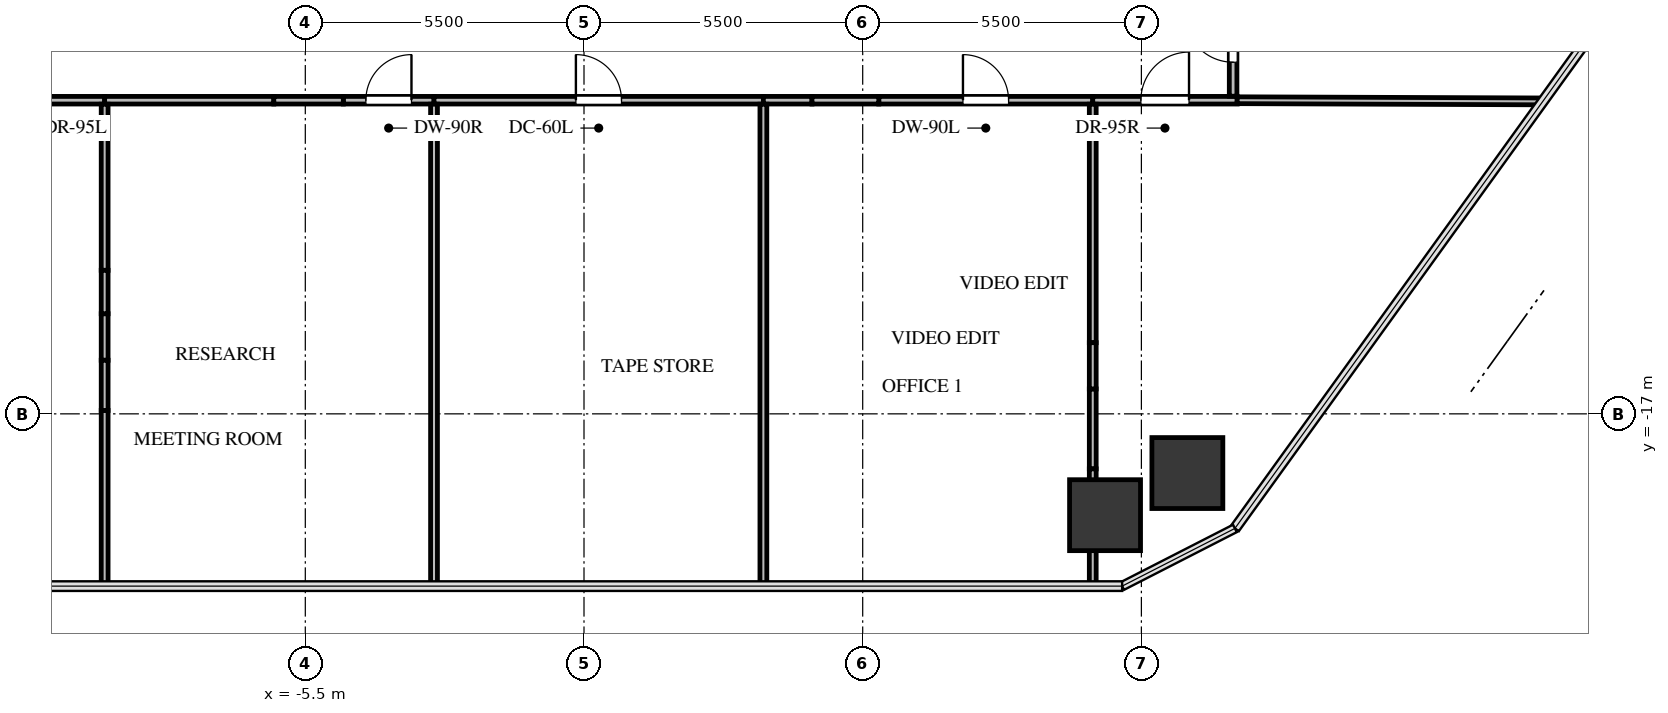
"""IFC4 building model, lengths in metres.
Left out: names, types, materials, properties, quantities, classifications, styles, units other than length and angle.
Written with IfcOpenShell. Run it as: python <this file> out.ifc"""

import sys

from ifc_helpers import new_model, si_unit, direction, frame, frame_2d, origin, origin_2d, place, context, subcontext, project, spatial, rectangle, extrude, source, transform, mapped, element, fill, save


model = new_model("IFC4")
c1 = context("Model", 3, precision=1e-05, world=origin(), true_north=direction((0.0, 1.0)))
c2 = subcontext(c1, "Body", "Model", "MODEL_VIEW")
j1 = project(units=[si_unit("LENGTHUNIT", "METRE"), si_unit("PLANEANGLEUNIT", "RADIAN")], contexts=[c1])
p1 = place(None, origin())
s1 = spatial("IfcSite", under=j1, at=p1, CompositionType="ELEMENT")
p2 = place(p1, origin())
s2 = spatial("IfcBuilding", under=s1, at=p2, CompositionType="ELEMENT")
p3 = place(p2, frame((0.0, 0.0, 42.3)))
s3 = spatial("IfcBuildingStorey", under=s2, at=p3, CompositionType="ELEMENT", Elevation=42.3)
m1 = source(origin(), c2, "Body", "SweptSolid", [
    extrude(rectangle(XDim=1.4, YDim=1.4, at=origin_2d()), origin(), (0.0, 0.0, 1.0), 3.3),
])
for number, where, z_axis, x_axis in (
    (1, (11.907, -18.168, -0.24), (0.0, 0.0, 1.0), (1.0, 0.0, 0.0)),
    (2, (10.283, -19.0, -0.24), (0.0, 0.0, 1.0), (1.0, 0.0, 0.0)),
):
    element("IfcColumn", number, at=place(p3, frame(where, z_axis=z_axis, x_axis=x_axis)), inside=s3, PredefinedType="COLUMN", context=c2, shape_type="MappedRepresentation", body=[
        mapped(m1, transform((0.0, 0.0, 0.0), x_axis=(1.0, 0.0, 0.0), y_axis=(0.0, 1.0, 0.0), z_axis=(0.0, 0.0, 1.0), scale=1.0)),
    ])
p4 = place(p3, frame((-12.89, -10.81, 0.0), z_axis=(0.0, 0.0, 1.0), x_axis=(1.0, 0.0, 0.0)))
e3 = element("IfcWall", 3, at=p4, inside=s3, PredefinedType="PARTITIONING", context=c2, shape_type="SweptSolid", body=[
    extrude(rectangle(XDim=3.43, YDim=0.15, at=frame_2d((1.715, 0.0))), origin(), (0.0, 0.0, 1.0), 3.045),
])
p5 = place(p4, frame((1.24, 0.0, 0.0)))
e4 = element("IfcOpeningElement", 4, at=p5, cuts=e3, PredefinedType="OPENING", context=c2, shape_type="SweptSolid", body=[
    extrude(rectangle(XDim=0.95, YDim=2.1, at=frame_2d((0.475, 1.05))), frame((0.0, 0.085, 0.0), z_axis=(0.0, -1.0, 0.0), x_axis=(1.0, 0.0, 0.0)), (0.0, 0.0, 1.0), 0.17),
])
p6 = place(p3, frame((-9.46, -10.81, 0.0), z_axis=(0.0, 0.0, 1.0), x_axis=(1.0, 0.0, 0.0)))
e5 = element("IfcWall", 5, at=p6, inside=s3, PredefinedType="PARTITIONING", context=c2, shape_type="SweptSolid", body=[
    extrude(rectangle(XDim=3.338, YDim=0.15, at=frame_2d((1.669, 0.0))), origin(), (0.0, 0.0, 1.0), 2.13),
])
p7 = place(p3, frame((-4.75, -10.81, 0.0), z_axis=(0.0, 0.0, 1.0), x_axis=(1.0, 0.0, 0.0)))
e6 = element("IfcWall", 6, at=p7, inside=s3, PredefinedType="PARTITIONING", context=c2, shape_type="SweptSolid", body=[
    extrude(rectangle(XDim=1.79, YDim=0.15, at=frame_2d((0.895, 0.0))), origin(), (0.0, 0.0, 1.0), 3.045),
])
p8 = place(p7, frame((0.445, 0.0, 0.0)))
e7 = element("IfcOpeningElement", 7, at=p8, cuts=e6, PredefinedType="OPENING", context=c2, shape_type="SweptSolid", body=[
    extrude(rectangle(XDim=0.9, YDim=2.05, at=frame_2d((0.45, 1.025))), frame((0.0, 0.085, 0.0), z_axis=(0.0, -1.0, 0.0), x_axis=(1.0, 0.0, 0.0)), (0.0, 0.0, 1.0), 0.17),
])
p9 = place(p3, frame((-6.122, -10.81, 0.0), z_axis=(0.0, 0.0, 1.0), x_axis=(1.0, 0.0, 0.0)))
e8 = element("IfcWall", 8, at=p9, inside=s3, PredefinedType="PARTITIONING", context=c2, shape_type="SweptSolid", body=[
    extrude(rectangle(XDim=1.372, YDim=0.15, at=frame_2d((0.686, 0.0))), origin(), (0.0, 0.0, 1.0), 2.13),
])
p10 = place(p3, frame((-2.96, -10.81, 0.0), z_axis=(0.0, 0.0, 1.0), x_axis=(1.0, 0.0, 0.0)))
e9 = element("IfcWall", 9, at=p10, inside=s3, PredefinedType="PARTITIONING", context=c2, shape_type="SweptSolid", body=[
    extrude(rectangle(XDim=6.5, YDim=0.15, at=frame_2d((3.25, 0.0))), origin(), (0.0, 0.0, 1.0), 3.045),
])
p11 = place(p10, frame((2.8, 0.0, 0.0)))
e10 = element("IfcOpeningElement", 10, at=p11, cuts=e9, PredefinedType="OPENING", context=c2, shape_type="SweptSolid", body=[
    extrude(rectangle(XDim=0.9, YDim=2.05, at=frame_2d((0.45, 1.025))), frame((0.0, 0.085, 0.0), z_axis=(0.0, -1.0, 0.0), x_axis=(1.0, 0.0, 0.0)), (0.0, 0.0, 1.0), 0.17),
])
p12 = place(p3, frame((3.54, -10.81, 0.0), z_axis=(0.0, 0.0, 1.0), x_axis=(1.0, 0.0, 0.0)))
e11 = element("IfcWall", 11, at=p12, inside=s3, PredefinedType="PARTITIONING", context=c2, shape_type="SweptSolid", body=[
    extrude(rectangle(XDim=0.959, YDim=0.15, at=frame_2d((0.479, 0.0))), origin(), (0.0, 0.0, 1.0), 3.045),
])
p13 = place(p3, frame((5.817, -10.81, 0.0), z_axis=(0.0, 0.0, 1.0), x_axis=(1.0, 0.0, 0.0)))
e12 = element("IfcWall", 12, at=p13, inside=s3, PredefinedType="PARTITIONING", context=c2, shape_type="SweptSolid", body=[
    extrude(rectangle(XDim=4.223, YDim=0.15, at=frame_2d((2.111, 0.0))), origin(), (0.0, 0.0, 1.0), 2.13),
])
p14 = place(p13, frame((1.661, 0.0, 0.0)))
e13 = element("IfcOpeningElement", 13, at=p14, cuts=e12, PredefinedType="OPENING", context=c2, shape_type="SweptSolid", body=[
    extrude(rectangle(XDim=0.9, YDim=2.05, at=frame_2d((0.45, 1.025))), frame((0.0, 0.085, 0.0), z_axis=(0.0, -1.0, 0.0), x_axis=(1.0, 0.0, 0.0)), (0.0, 0.0, 1.0), 0.17),
])
p15 = place(p3, frame((4.499, -10.81, 0.0), z_axis=(0.0, 0.0, 1.0), x_axis=(1.0, 0.0, 0.0)))
e14 = element("IfcWall", 14, at=p15, inside=s3, PredefinedType="PARTITIONING", context=c2, shape_type="SweptSolid", body=[
    extrude(rectangle(XDim=1.318, YDim=0.15, at=frame_2d((0.659, 0.0))), origin(), (0.0, 0.0, 1.0), 2.13),
])
p16 = place(p3, frame((10.04, -10.81, 0.0), z_axis=(0.0, 0.0, 1.0), x_axis=(1.0, 0.0, 0.0)))
e15 = element("IfcWall", 15, at=p16, inside=s3, PredefinedType="PARTITIONING", context=c2, shape_type="SweptSolid", body=[
    extrude(rectangle(XDim=2.85, YDim=0.15, at=frame_2d((1.425, 0.0))), origin(), (0.0, 0.0, 1.0), 3.045),
])
p17 = place(p16, frame((0.95, 0.0, 0.0)))
e16 = element("IfcOpeningElement", 16, at=p17, cuts=e15, PredefinedType="OPENING", context=c2, shape_type="SweptSolid", body=[
    extrude(rectangle(XDim=0.95, YDim=2.1, at=frame_2d((0.475, 1.05))), frame((0.0, 0.085, 0.0), z_axis=(0.0, -1.0, 0.0), x_axis=(1.0, 0.0, 0.0)), (0.0, 0.0, 1.0), 0.17),
])
p18 = place(p3, frame((12.81, -10.731, 0.0), z_axis=(0.0, 0.0, 1.0), x_axis=(0.0, 1.0, 0.0)))
e17 = element("IfcWall", 17, at=p18, inside=s3, PredefinedType="PARTITIONING", context=c2, shape_type="SweptSolid", body=[
    extrude(rectangle(XDim=2.291, YDim=0.15, at=frame_2d((1.146, 0.0))), origin(), (0.0, 0.0, 1.0), 3.045),
])
p19 = place(p18, frame((0.67, 0.0, 0.0)))
e18 = element("IfcOpeningElement", 18, at=p19, cuts=e17, PredefinedType="OPENING", context=c2, shape_type="SweptSolid", body=[
    extrude(rectangle(XDim=0.95, YDim=2.1, at=frame_2d((0.475, 1.05))), frame((0.0, 0.085, 0.0), z_axis=(0.0, -1.0, 0.0), x_axis=(1.0, 0.0, 0.0)), (0.0, 0.0, 1.0), 0.17),
])
p20 = place(p3, frame((-9.46, -10.889, 0.0), z_axis=(0.0, 0.0, 1.0), x_axis=(0.0, -1.0, 0.0)))
e19 = element("IfcWall", 19, at=p20, inside=s3, PredefinedType="PARTITIONING", context=c2, shape_type="SweptSolid", body=[
    extrude(rectangle(XDim=3.278, YDim=0.135, at=frame_2d((1.639, 0.0))), origin(), (0.0, 0.0, 1.0), 2.13),
])
p21 = place(p3, frame((-9.46, -15.024, 0.0), z_axis=(0.0, 0.0, 1.0), x_axis=(0.0, -1.0, 0.0)))
e20 = element("IfcWall", 20, at=p21, inside=s3, PredefinedType="PARTITIONING", context=c2, shape_type="SweptSolid", body=[
    extrude(rectangle(XDim=0.918, YDim=0.135, at=frame_2d((0.459, 0.0))), origin(), (0.0, 0.0, 1.0), 2.13),
])
p22 = place(p3, frame((-9.46, -16.933, 0.0), z_axis=(0.0, 0.0, 1.0), x_axis=(0.0, -1.0, 0.0)))
e21 = element("IfcWall", 21, at=p22, inside=s3, PredefinedType="PARTITIONING", context=c2, shape_type="SweptSolid", body=[
    extrude(rectangle(XDim=3.467, YDim=0.135, at=frame_2d((1.733, 0.0))), origin(), (0.0, 0.0, 1.0), 2.13),
])
p23 = place(p3, frame((-9.46, -14.167, 0.0), z_axis=(0.0, 0.0, 1.0), x_axis=(0.0, -1.0, 0.0)))
e22 = element("IfcWall", 22, at=p23, inside=s3, PredefinedType="PARTITIONING", context=c2, shape_type="SweptSolid", body=[
    extrude(rectangle(XDim=0.857, YDim=0.135, at=frame_2d((0.428, 0.0))), origin(), (0.0, 0.0, 1.0), 2.13),
])
p24 = place(p3, frame((-9.46, -15.942, 0.0), z_axis=(0.0, 0.0, 1.0), x_axis=(0.0, -1.0, 0.0)))
e23 = element("IfcWall", 23, at=p24, inside=s3, PredefinedType="PARTITIONING", context=c2, shape_type="SweptSolid", body=[
    extrude(rectangle(XDim=0.99, YDim=0.135, at=frame_2d((0.495, 0.0))), origin(), (0.0, 0.0, 1.0), 2.13),
])
for number, where, z_axis, x_axis in (
    (24, (-2.96, -10.889, 0.0), (0.0, 0.0, 1.0), (0.0, -1.0, 0.0)),
    (25, (3.54, -10.889, 0.0), (0.0, 0.0, 1.0), (0.0, -1.0, 0.0)),
):
    element("IfcWall", number, at=place(p3, frame(where, z_axis=z_axis, x_axis=x_axis)), inside=s3, PredefinedType="PARTITIONING", context=c2, shape_type="SweptSolid", body=[
        extrude(rectangle(XDim=9.511, YDim=0.135, at=frame_2d((4.755, 0.0))), origin(), (0.0, 0.0, 1.0), 2.38),
    ])
p25 = place(p3, frame((10.04, -10.889, 0.0), z_axis=(0.0, 0.0, 1.0), x_axis=(0.0, -1.0, 0.0)))
e26 = element("IfcWall", 26, at=p25, inside=s3, PredefinedType="PARTITIONING", context=c2, shape_type="SweptSolid", body=[
    extrude(rectangle(XDim=4.707, YDim=0.135, at=frame_2d((2.354, 0.0))), origin(), (0.0, 0.0, 1.0), 2.13),
])
p26 = place(p3, frame((10.04, -16.509, 0.0), z_axis=(0.0, 0.0, 1.0), x_axis=(0.0, -1.0, 0.0)))
e27 = element("IfcWall", 27, at=p26, inside=s3, PredefinedType="PARTITIONING", context=c2, shape_type="SweptSolid", body=[
    extrude(rectangle(XDim=1.578, YDim=0.135, at=frame_2d((0.789, 0.0))), origin(), (0.0, 0.0, 1.0), 2.13),
])
p27 = place(p3, frame((10.04, -15.596, 0.0), z_axis=(0.0, 0.0, 1.0), x_axis=(0.0, -1.0, 0.0)))
e28 = element("IfcWall", 28, at=p27, inside=s3, PredefinedType="PARTITIONING", context=c2, shape_type="SweptSolid", body=[
    extrude(rectangle(XDim=0.913, YDim=0.135, at=frame_2d((0.457, 0.0))), origin(), (0.0, 0.0, 1.0), 2.13),
])
p28 = place(p3, frame((10.04, -18.086, 0.0), z_axis=(0.0, 0.0, 1.0), x_axis=(0.0, -1.0, 0.0)))
e29 = element("IfcWall", 29, at=p28, inside=s3, PredefinedType="PARTITIONING", context=c2, shape_type="SweptSolid", body=[
    extrude(rectangle(XDim=2.314, YDim=0.135, at=frame_2d((1.157, 0.0))), origin(), (0.0, 0.0, 1.0), 1.877),
])
p29 = place(p3, frame((12.89, -10.81, 0.0), z_axis=(0.0, 0.0, 1.0), x_axis=(0.999992607823, -0.003845035728, 0.0)))
e30 = element("IfcWall", 30, at=p29, inside=s3, PredefinedType="PARTITIONING", context=c2, shape_type="SweptSolid", body=[
    extrude(rectangle(XDim=6.032, YDim=0.135, at=frame_2d((3.016, 0.0))), origin(), (0.0, 0.0, 1.0), 2.38),
])
m2 = source(origin(), c2, "Body", "SweptSolid", [
    extrude(rectangle(XDim=0.9, YDim=2.05, at=frame_2d((0.45, 1.025))), frame((0.0, 0.025, 0.0), z_axis=(0.0, -1.0, 0.0), x_axis=(1.0, 0.0, 0.0)), (0.0, 0.0, 1.0), 0.05),
])
p30 = place(p8, origin())
e31 = element("IfcDoor", 31, at=p30, inside=s3, OperationType="SINGLE_SWING_RIGHT", PredefinedType="DOOR", context=c2, shape_type="MappedRepresentation", body=[
    mapped(m2, transform((0.0, 0.0, 0.0), x_axis=(1.0, 0.0, 0.0), y_axis=(0.0, 1.0, 0.0), z_axis=(0.0, 0.0, 1.0), scale=1.0)),
])
fill(e7, e31)
m3 = source(origin(), c2, "Body", "SweptSolid", [
    extrude(rectangle(XDim=0.9, YDim=2.05, at=frame_2d((0.45, 1.025))), frame((0.0, 0.025, 0.0), z_axis=(0.0, -1.0, 0.0), x_axis=(1.0, 0.0, 0.0)), (0.0, 0.0, 1.0), 0.05),
])
p31 = place(p11, origin())
e32 = element("IfcDoor", 32, at=p31, inside=s3, OperationType="SINGLE_SWING_LEFT", PredefinedType="DOOR", context=c2, shape_type="MappedRepresentation", body=[
    mapped(m3, transform((0.0, 0.0, 0.0), x_axis=(1.0, 0.0, 0.0), y_axis=(0.0, 1.0, 0.0), z_axis=(0.0, 0.0, 1.0), scale=1.0)),
])
fill(e10, e32)
m4 = source(origin(), c2, "Body", "SweptSolid", [
    extrude(rectangle(XDim=0.9, YDim=2.05, at=frame_2d((0.45, 1.025))), frame((0.0, 0.025, 0.0), z_axis=(0.0, -1.0, 0.0), x_axis=(1.0, 0.0, 0.0)), (0.0, 0.0, 1.0), 0.05),
])
p32 = place(p14, origin())
e33 = element("IfcDoor", 33, at=p32, inside=s3, OperationType="SINGLE_SWING_LEFT", PredefinedType="DOOR", context=c2, shape_type="MappedRepresentation", body=[
    mapped(m4, transform((0.0, 0.0, 0.0), x_axis=(1.0, 0.0, 0.0), y_axis=(0.0, 1.0, 0.0), z_axis=(0.0, 0.0, 1.0), scale=1.0)),
])
fill(e13, e33)
m5 = source(origin(), c2, "Body", "SweptSolid", [
    extrude(rectangle(XDim=0.95, YDim=2.1, at=frame_2d((0.475, 1.05))), frame((0.0, 0.025, 0.0), z_axis=(0.0, -1.0, 0.0), x_axis=(1.0, 0.0, 0.0)), (0.0, 0.0, 1.0), 0.05),
])
p33 = place(p17, origin())
e34 = element("IfcDoor", 34, at=p33, inside=s3, OperationType="SINGLE_SWING_RIGHT", PredefinedType="DOOR", context=c2, shape_type="MappedRepresentation", body=[
    mapped(m5, transform((0.0, 0.0, 0.0), x_axis=(1.0, 0.0, 0.0), y_axis=(0.0, 1.0, 0.0), z_axis=(0.0, 0.0, 1.0), scale=1.0)),
])
fill(e16, e34)
p34 = place(p19, origin())
e35 = element("IfcDoor", 35, at=p34, inside=s3, OperationType="SINGLE_SWING_RIGHT", PredefinedType="DOOR", context=c2, shape_type="MappedRepresentation", body=[
    mapped(m5, transform((0.0, 0.0, 0.0), x_axis=(1.0, 0.0, 0.0), y_axis=(0.0, 1.0, 0.0), z_axis=(0.0, 0.0, 1.0), scale=1.0)),
])
fill(e18, e35)
save(model, sys.argv[1])
